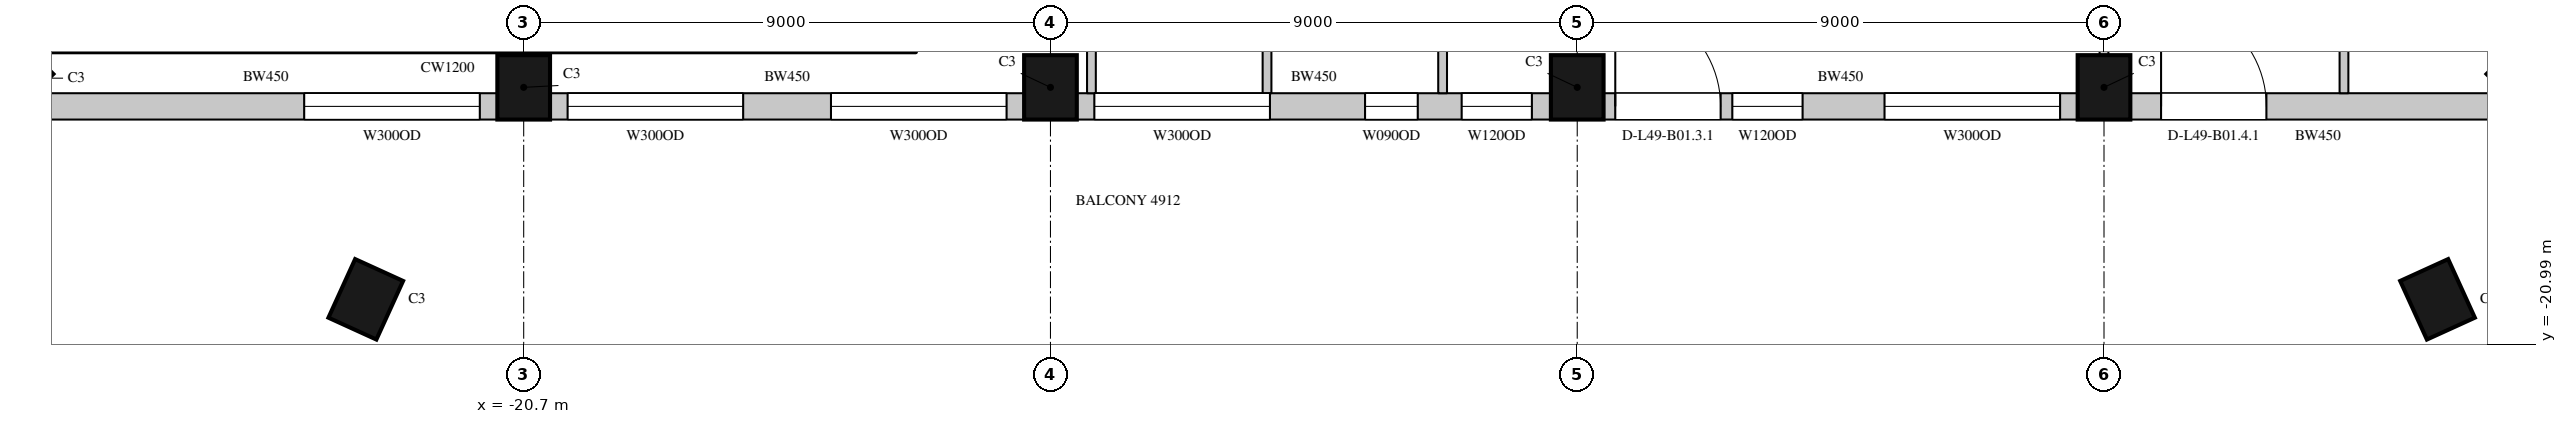
"""IFC4 building model, lengths in metres.
Left out: names, types, materials, properties, quantities, classifications, styles, units other than length and angle.
Written with IfcOpenShell. Run it as: python <this file> out.ifc"""

import sys

from ifc_helpers import new_model, si_unit, direction, frame, frame_2d, origin, origin_2d, place, context, subcontext, project, spatial, rectangle, extrude, element, fill, save


model = new_model("IFC4")
c1 = context("Model", 3, precision=1e-05, world=origin(), true_north=direction((0.0, 1.0)))
c2 = subcontext(c1, "Body", "Model", "MODEL_VIEW")
j1 = project(units=[si_unit("LENGTHUNIT", "METRE"), si_unit("PLANEANGLEUNIT", "RADIAN")], contexts=[c1])
p1 = place(None, origin())
s1 = spatial("IfcSite", under=j1, at=p1, CompositionType="ELEMENT")
p2 = place(p1, origin())
s2 = spatial("IfcBuilding", under=s1, at=p2, CompositionType="ELEMENT")
p3 = place(p2, frame((0.0, 0.0, 222.0)))
s3 = spatial("IfcBuildingStorey", under=s2, at=p3, CompositionType="ELEMENT", Elevation=222.0)
for number, where, z_axis, x_axis in (
    (1, (-29.443, -16.443, 0.0), (0.0, 0.0, 1.0), (0.707, -0.707, 0.0)),
    (2, (-20.7, -16.6, 0.0), (0.0, 0.0, 1.0), (1.0, 0.0, 0.0)),
    (3, (-11.7, -16.6, 0.0), (0.0, 0.0, 1.0), (1.0, 0.0, 0.0)),
    (4, (-2.7, -16.6, 0.0), (0.0, 0.0, 1.0), (1.0, 0.0, 0.0)),
    (5, (6.3, -16.6, 0.0), (0.0, 0.0, 1.0), (1.0, 0.0, 0.0)),
    (6, (13.543, -16.443, 0.0), (0.0, 0.0, 1.0), (0.707, 0.707, 0.0)),
    (7, (-23.398, -20.221, 0.0), (0.0, 0.0, 1.0), (0.91, -0.415, 0.0)),
    (8, (11.998, -20.221, 0.0), (0.0, 0.0, 1.0), (0.91, 0.415, 0.0)),
):
    element("IfcColumn", number, at=place(p3, frame(where, z_axis=z_axis, x_axis=x_axis)), inside=s3, PredefinedType="COLUMN", context=c2, shape_type="SweptSolid", body=[
        extrude(rectangle(XDim=0.9, YDim=1.1, at=origin_2d()), origin(), (0.0, 0.0, 1.0), 4.1),
    ])
p4 = place(p3, frame((-29.064, -16.925, 0.0), z_axis=(0.0, 0.0, 1.0), x_axis=(1.0, 0.0, 0.0)))
e9 = element("IfcWall", 9, at=p4, inside=s3, PredefinedType="SOLIDWALL", context=c2, shape_type="SweptSolid", body=[
    extrude(rectangle(XDim=7.914, YDim=0.45, at=frame_2d((3.957, 0.0))), origin(), (0.0, 0.0, 1.0), 3.8),
])
p5 = place(p4, frame((4.614, 0.0, 1.05)))
e10 = element("IfcOpeningElement", 10, at=p5, cuts=e9, PredefinedType="OPENING", context=c2, shape_type="SweptSolid", body=[
    extrude(rectangle(XDim=3.0, YDim=2.4, at=frame_2d((1.5, 1.2))), frame((0.0, 0.235, 0.0), z_axis=(0.0, -1.0, 0.0), x_axis=(1.0, 0.0, 0.0)), (0.0, 0.0, 1.0), 0.47),
])
p6 = place(p3, frame((-20.25, -16.925, 0.0), z_axis=(0.0, 0.0, 1.0), x_axis=(1.0, 0.0, 0.0)))
e11 = element("IfcWall", 11, at=p6, inside=s3, PredefinedType="SOLIDWALL", context=c2, shape_type="SweptSolid", body=[
    extrude(rectangle(XDim=8.1, YDim=0.45, at=frame_2d((4.05, 0.0))), origin(), (0.0, 0.0, 1.0), 3.8),
])
p7 = place(p6, frame((0.3, 0.0, 1.05)))
e12 = element("IfcOpeningElement", 12, at=p7, cuts=e11, PredefinedType="OPENING", context=c2, shape_type="SweptSolid", body=[
    extrude(rectangle(XDim=3.0, YDim=2.4, at=frame_2d((1.5, 1.2))), frame((0.0, 0.235, 0.0), z_axis=(0.0, -1.0, 0.0), x_axis=(1.0, 0.0, 0.0)), (0.0, 0.0, 1.0), 0.47),
])
p8 = place(p6, frame((4.8, 0.0, 1.05)))
e13 = element("IfcOpeningElement", 13, at=p8, cuts=e11, PredefinedType="OPENING", context=c2, shape_type="SweptSolid", body=[
    extrude(rectangle(XDim=3.0, YDim=2.4, at=frame_2d((1.5, 1.2))), frame((0.0, 0.235, 0.0), z_axis=(0.0, -1.0, 0.0), x_axis=(1.0, 0.0, 0.0)), (0.0, 0.0, 1.0), 0.47),
])
p9 = place(p3, frame((-11.25, -16.925, 0.0), z_axis=(0.0, 0.0, 1.0), x_axis=(1.0, 0.0, 0.0)))
e14 = element("IfcWall", 14, at=p9, inside=s3, PredefinedType="SOLIDWALL", context=c2, shape_type="SweptSolid", body=[
    extrude(rectangle(XDim=8.1, YDim=0.45, at=frame_2d((4.05, 0.0))), origin(), (0.0, 0.0, 1.0), 3.8),
])
p10 = place(p9, frame((0.3, 0.0, 1.05)))
e15 = element("IfcOpeningElement", 15, at=p10, cuts=e14, PredefinedType="OPENING", context=c2, shape_type="SweptSolid", body=[
    extrude(rectangle(XDim=3.0, YDim=2.4, at=frame_2d((1.5, 1.2))), frame((0.0, 0.235, 0.0), z_axis=(0.0, -1.0, 0.0), x_axis=(1.0, 0.0, 0.0)), (0.0, 0.0, 1.0), 0.47),
])
p11 = place(p9, frame((4.925, 0.0, 1.05)))
e16 = element("IfcOpeningElement", 16, at=p11, cuts=e14, PredefinedType="OPENING", context=c2, shape_type="SweptSolid", body=[
    extrude(rectangle(XDim=0.9, YDim=2.4, at=frame_2d((0.45, 1.2))), frame((0.0, 0.235, 0.0), z_axis=(0.0, -1.0, 0.0), x_axis=(1.0, 0.0, 0.0)), (0.0, 0.0, 1.0), 0.47),
])
p12 = place(p9, frame((6.575, 0.0, 1.05)))
e17 = element("IfcOpeningElement", 17, at=p12, cuts=e14, PredefinedType="OPENING", context=c2, shape_type="SweptSolid", body=[
    extrude(rectangle(XDim=1.2, YDim=2.4, at=frame_2d((0.6, 1.2))), frame((0.0, 0.235, 0.0), z_axis=(0.0, -1.0, 0.0), x_axis=(1.0, 0.0, 0.0)), (0.0, 0.0, 1.0), 0.47),
])
p13 = place(p3, frame((-2.25, -16.925, 0.0), z_axis=(0.0, 0.0, 1.0), x_axis=(1.0, 0.0, 0.0)))
e18 = element("IfcWall", 18, at=p13, inside=s3, PredefinedType="SOLIDWALL", context=c2, shape_type="SweptSolid", body=[
    extrude(rectangle(XDim=8.1, YDim=0.45, at=frame_2d((4.05, 0.0))), origin(), (0.0, 0.0, 1.0), 3.8),
])
p14 = place(p13, frame((0.2, 0.0, 0.0)))
e19 = element("IfcOpeningElement", 19, at=p14, cuts=e18, PredefinedType="OPENING", context=c2, shape_type="SweptSolid", body=[
    extrude(rectangle(XDim=1.8, YDim=2.4, at=frame_2d((0.9, 1.2))), frame((0.0, 0.235, 0.0), z_axis=(0.0, -1.0, 0.0), x_axis=(1.0, 0.0, 0.0)), (0.0, 0.0, 1.0), 0.47),
])
p15 = place(p13, frame((2.2, 0.0, 1.05)))
e20 = element("IfcOpeningElement", 20, at=p15, cuts=e18, PredefinedType="OPENING", context=c2, shape_type="SweptSolid", body=[
    extrude(rectangle(XDim=1.2, YDim=2.4, at=frame_2d((0.6, 1.2))), frame((0.0, 0.235, 0.0), z_axis=(0.0, -1.0, 0.0), x_axis=(1.0, 0.0, 0.0)), (0.0, 0.0, 1.0), 0.47),
])
p16 = place(p13, frame((4.8, 0.0, 1.05)))
e21 = element("IfcOpeningElement", 21, at=p16, cuts=e18, PredefinedType="OPENING", context=c2, shape_type="SweptSolid", body=[
    extrude(rectangle(XDim=3.0, YDim=2.4, at=frame_2d((1.5, 1.2))), frame((0.0, 0.235, 0.0), z_axis=(0.0, -1.0, 0.0), x_axis=(1.0, 0.0, 0.0)), (0.0, 0.0, 1.0), 0.47),
])
p17 = place(p3, frame((6.75, -16.925, 0.0), z_axis=(0.0, 0.0, 1.0), x_axis=(1.0, 0.0, 0.0)))
e22 = element("IfcWall", 22, at=p17, inside=s3, PredefinedType="SOLIDWALL", context=c2, shape_type="SweptSolid", body=[
    extrude(rectangle(XDim=6.414, YDim=0.45, at=frame_2d((3.207, 0.0))), origin(), (0.0, 0.0, 1.0), 3.8),
])
p18 = place(p17, frame((0.525, 0.0, 0.0)))
e23 = element("IfcOpeningElement", 23, at=p18, cuts=e22, PredefinedType="OPENING", context=c2, shape_type="SweptSolid", body=[
    extrude(rectangle(XDim=1.8, YDim=2.4, at=frame_2d((0.9, 1.2))), frame((0.0, 0.235, 0.0), z_axis=(0.0, -1.0, 0.0), x_axis=(1.0, 0.0, 0.0)), (0.0, 0.0, 1.0), 0.47),
])
p19 = place(p3, frame((-26.95, -18.0, 0.0), z_axis=(0.0, 0.0, 1.0), x_axis=(1.0, 0.0, 0.0)))
e24 = element("IfcWall", 24, at=p19, inside=s3, PredefinedType="SOLIDWALL", context=c2, shape_type="SweptSolid", body=[
    extrude(rectangle(XDim=2.36, YDim=0.45, at=frame_2d((1.18, 0.0))), origin(), (0.0, 0.0, 1.0), 0.6),
])
for number, where, z_axis, x_axis in (
    (25, (-15.77, -18.0, 0.0), (0.0, 0.0, 1.0), (1.0, 0.0, 0.0)),
    (26, (-11.81, -18.0, 0.0), (0.0, 0.0, 1.0), (1.0, 0.0, 0.0)),
):
    element("IfcWall", number, at=place(p3, frame(where, z_axis=z_axis, x_axis=x_axis)), inside=s3, PredefinedType="SOLIDWALL", context=c2, shape_type="SweptSolid", body=[
        extrude(rectangle(XDim=3.76, YDim=0.45, at=frame_2d((1.88, 0.0))), origin(), (0.0, 0.0, 1.0), 0.6),
    ])
p20 = place(p3, frame((4.03, -18.0, 0.0), z_axis=(0.0, 0.0, 1.0), x_axis=(1.0, 0.0, 0.0)))
e27 = element("IfcWall", 27, at=p20, inside=s3, PredefinedType="SOLIDWALL", context=c2, shape_type="SweptSolid", body=[
    extrude(rectangle(XDim=2.945, YDim=0.45, at=frame_2d((1.473, 0.0))), origin(), (0.0, 0.0, 1.0), 0.6),
])
p21 = place(p3, frame((-11.0, -16.7, 0.0), z_axis=(0.0, 0.0, 1.0), x_axis=(0.0, 1.0, 0.0)))
e28 = element("IfcWall", 28, at=p21, inside=s3, PredefinedType="PARTITIONING", context=c2, shape_type="SweptSolid", body=[
    extrude(rectangle(XDim=1.88, YDim=0.15, at=frame_2d((0.94, 0.0))), origin(), (0.0, 0.0, 1.0), 3.8),
])
for number, where, z_axis, x_axis in (
    (29, (-8.0, -16.7, 0.0), (0.0, 0.0, 1.0), (0.0, 1.0, 0.0)),
    (30, (-5.0, -16.7, 0.0), (0.0, 0.0, 1.0), (0.0, 1.0, 0.0)),
):
    element("IfcWall", number, at=place(p3, frame(where, z_axis=z_axis, x_axis=x_axis)), inside=s3, PredefinedType="PARTITIONING", context=c2, shape_type="SweptSolid", body=[
        extrude(rectangle(XDim=5.2, YDim=0.15, at=frame_2d((2.6, 0.0))), origin(), (0.0, 0.0, 1.0), 3.8),
    ])
p22 = place(p3, frame((6.3, -16.05, 0.0), z_axis=(0.0, 0.0, 1.0), x_axis=(0.0, 1.0, 0.0)))
e31 = element("IfcWall", 31, at=p22, inside=s3, PredefinedType="PARTITIONING", context=c2, shape_type="SweptSolid", body=[
    extrude(rectangle(XDim=4.55, YDim=0.15, at=frame_2d((2.275, 0.0))), origin(), (0.0, 0.0, 1.0), 3.25),
])
p23 = place(p3, frame((10.4, -16.7, 0.0), z_axis=(0.0, 0.0, 1.0), x_axis=(0.0, 1.0, 0.0)))
e32 = element("IfcWall", 32, at=p23, inside=s3, PredefinedType="PARTITIONING", context=c2, shape_type="SweptSolid", body=[
    extrude(rectangle(XDim=5.3, YDim=0.15, at=frame_2d((2.65, 0.0))), origin(), (0.0, 0.0, 1.0), 3.8),
])
p24 = place(p5, origin())
e33 = element("IfcWindow", 33, at=p24, inside=s3, PartitioningType="SINGLE_PANEL", PredefinedType="WINDOW", context=c2, shape_type="SweptSolid", body=[
    extrude(rectangle(XDim=3.0, YDim=2.4, at=frame_2d((1.5, 1.2))), frame((0.0, 0.135, 0.0), z_axis=(0.0, -1.0, 0.0), x_axis=(1.0, 0.0, 0.0)), (0.0, 0.0, 1.0), 0.06),
])
fill(e10, e33)
p25 = place(p7, origin())
e34 = element("IfcWindow", 34, at=p25, inside=s3, PartitioningType="SINGLE_PANEL", PredefinedType="WINDOW", context=c2, shape_type="SweptSolid", body=[
    extrude(rectangle(XDim=3.0, YDim=2.4, at=frame_2d((1.5, 1.2))), frame((0.0, 0.135, 0.0), z_axis=(0.0, -1.0, 0.0), x_axis=(1.0, 0.0, 0.0)), (0.0, 0.0, 1.0), 0.06),
])
fill(e12, e34)
p26 = place(p8, origin())
e35 = element("IfcWindow", 35, at=p26, inside=s3, PartitioningType="SINGLE_PANEL", PredefinedType="WINDOW", context=c2, shape_type="SweptSolid", body=[
    extrude(rectangle(XDim=3.0, YDim=2.4, at=frame_2d((1.5, 1.2))), frame((0.0, 0.135, 0.0), z_axis=(0.0, -1.0, 0.0), x_axis=(1.0, 0.0, 0.0)), (0.0, 0.0, 1.0), 0.06),
])
fill(e13, e35)
p27 = place(p10, origin())
e36 = element("IfcWindow", 36, at=p27, inside=s3, PartitioningType="SINGLE_PANEL", PredefinedType="WINDOW", context=c2, shape_type="SweptSolid", body=[
    extrude(rectangle(XDim=3.0, YDim=2.4, at=frame_2d((1.5, 1.2))), frame((0.0, 0.135, 0.0), z_axis=(0.0, -1.0, 0.0), x_axis=(1.0, 0.0, 0.0)), (0.0, 0.0, 1.0), 0.06),
])
fill(e15, e36)
p28 = place(p14, origin())
e37 = element("IfcDoor", 37, at=p28, inside=s3, OperationType="SLIDING_TO_LEFT", PredefinedType="DOOR", context=c2, shape_type="SweptSolid", body=[
    extrude(rectangle(XDim=1.8, YDim=2.4, at=frame_2d((0.9, 1.2))), frame((0.0, 0.13, 0.0), z_axis=(0.0, -1.0, 0.0), x_axis=(1.0, 0.0, 0.0)), (0.0, 0.0, 1.0), 0.05),
])
fill(e19, e37)
p29 = place(p15, origin())
e38 = element("IfcWindow", 38, at=p29, inside=s3, PartitioningType="SINGLE_PANEL", PredefinedType="WINDOW", context=c2, shape_type="SweptSolid", body=[
    extrude(rectangle(XDim=1.2, YDim=2.4, at=frame_2d((0.6, 1.2))), frame((0.0, 0.135, 0.0), z_axis=(0.0, -1.0, 0.0), x_axis=(1.0, 0.0, 0.0)), (0.0, 0.0, 1.0), 0.06),
])
fill(e20, e38)
p30 = place(p16, origin())
e39 = element("IfcWindow", 39, at=p30, inside=s3, PartitioningType="SINGLE_PANEL", PredefinedType="WINDOW", context=c2, shape_type="SweptSolid", body=[
    extrude(rectangle(XDim=3.0, YDim=2.4, at=frame_2d((1.5, 1.2))), frame((0.0, 0.135, 0.0), z_axis=(0.0, -1.0, 0.0), x_axis=(1.0, 0.0, 0.0)), (0.0, 0.0, 1.0), 0.06),
])
fill(e21, e39)
p31 = place(p18, origin())
e40 = element("IfcDoor", 40, at=p31, inside=s3, OperationType="SLIDING_TO_LEFT", PredefinedType="DOOR", context=c2, shape_type="SweptSolid", body=[
    extrude(rectangle(XDim=1.8, YDim=2.4, at=frame_2d((0.9, 1.2))), frame((0.0, 0.13, 0.0), z_axis=(0.0, -1.0, 0.0), x_axis=(1.0, 0.0, 0.0)), (0.0, 0.0, 1.0), 0.05),
])
fill(e23, e40)
p32 = place(p11, origin())
e41 = element("IfcWindow", 41, at=p32, inside=s3, PartitioningType="SINGLE_PANEL", PredefinedType="WINDOW", context=c2, shape_type="SweptSolid", body=[
    extrude(rectangle(XDim=0.9, YDim=2.4, at=frame_2d((0.45, 1.2))), frame((0.0, 0.135, 0.0), z_axis=(0.0, -1.0, 0.0), x_axis=(1.0, 0.0, 0.0)), (0.0, 0.0, 1.0), 0.06),
])
fill(e16, e41)
p33 = place(p12, origin())
e42 = element("IfcWindow", 42, at=p33, inside=s3, PartitioningType="SINGLE_PANEL", PredefinedType="WINDOW", context=c2, shape_type="SweptSolid", body=[
    extrude(rectangle(XDim=1.2, YDim=2.4, at=frame_2d((0.6, 1.2))), frame((0.0, 0.135, 0.0), z_axis=(0.0, -1.0, 0.0), x_axis=(1.0, 0.0, 0.0)), (0.0, 0.0, 1.0), 0.06),
])
fill(e17, e42)
save(model, sys.argv[1])
